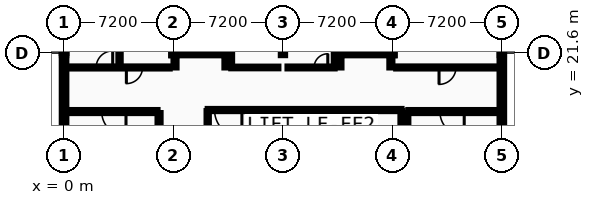
"""IFC4 building model, lengths in metres.
Left out: names, types, materials, properties, quantities, classifications, styles, units other than length and angle.
Written with IfcOpenShell. Run it as: python <this file> out.ifc"""

import sys

from ifc_helpers import new_model, si_unit, direction, frame, frame_2d, origin, origin_2d, place, context, subcontext, project, spatial, rectangle, i_section, extrude, element, fill, save


model = new_model("IFC4")
c1 = context("Model", 3, precision=1e-05, world=origin(), true_north=direction((0.0, 1.0)))
c2 = subcontext(c1, "Body", "Model", "MODEL_VIEW")
j1 = project(units=[si_unit("LENGTHUNIT", "METRE"), si_unit("PLANEANGLEUNIT", "RADIAN")], contexts=[c1])
p1 = place(None, origin())
s1 = spatial("IfcSite", under=j1, at=p1, CompositionType="ELEMENT")
p2 = place(p1, origin())
s2 = spatial("IfcBuilding", under=s1, at=p2, CompositionType="ELEMENT")
p3 = place(p2, frame((0.0, 0.0, 27.2)))
s3 = spatial("IfcBuildingStorey", under=s2, at=p3, CompositionType="ELEMENT", Elevation=27.2)
for number, where, z_axis, x_axis in (
    (1, (0.0, 21.6, 0.0), (0.0, 0.0, 1.0), (1.0, 0.0, 0.0)),
    (2, (7.2, 21.6, 0.0), (0.0, 0.0, 1.0), (1.0, 0.0, 0.0)),
    (3, (14.4, 21.6, 0.0), (0.0, 0.0, 1.0), (1.0, 0.0, 0.0)),
    (4, (21.6, 21.6, 0.0), (0.0, 0.0, 1.0), (1.0, 0.0, 0.0)),
    (5, (28.8, 21.6, 0.0), (0.0, 0.0, 1.0), (1.0, 0.0, 0.0)),
):
    element("IfcColumn", number, at=place(p3, frame(where, z_axis=z_axis, x_axis=x_axis)), inside=s3, PredefinedType="COLUMN", context=c2, shape_type="SweptSolid", body=[
        extrude(i_section(OverallWidth=0.28, OverallDepth=0.28, WebThickness=0.01, FlangeThickness=0.018, FilletRadius=0.024, at=origin_2d()), origin(), (0.0, 0.0, 1.0), 4.4),
    ])
p4 = place(p3, frame((0.0, 21.6, 0.0), z_axis=(0.0, 0.0, 1.0), x_axis=(0.0, -1.0, 0.0)))
e6 = element("IfcWall", 6, at=p4, inside=s3, PredefinedType="STANDARD", context=c2, shape_type="SweptSolid", body=[
    extrude(rectangle(XDim=7.15, YDim=0.3, at=frame_2d((3.575, 0.0))), origin(), (0.0, 0.0, 1.0), 4.18),
])
p5 = place(p4, frame((1.596, 0.0, 0.95)))
e7 = element("IfcOpeningElement", 7, at=p5, cuts=e6, PredefinedType="OPENING", context=c2, shape_type="SweptSolid", body=[
    extrude(rectangle(XDim=1.098, YDim=1.26, at=frame_2d((0.549, 0.63))), frame((0.0, 0.16, 0.0), z_axis=(0.0, -1.0, 0.0), x_axis=(1.0, 0.0, 0.0)), (0.0, 0.0, 1.0), 0.32),
])
p6 = place(p4, frame((4.456, 0.0, 0.95)))
e8 = element("IfcOpeningElement", 8, at=p6, cuts=e6, PredefinedType="OPENING", context=c2, shape_type="SweptSolid", body=[
    extrude(rectangle(XDim=1.098, YDim=1.26, at=frame_2d((0.549, 0.63))), frame((0.0, 0.16, 0.0), z_axis=(0.0, -1.0, 0.0), x_axis=(1.0, 0.0, 0.0)), (0.0, 0.0, 1.0), 0.32),
])
p7 = place(p3, frame((0.0, 28.8, 0.0), z_axis=(0.0, 0.0, 1.0), x_axis=(0.0, -1.0, 0.0)))
e9 = element("IfcWall", 9, at=p7, inside=s3, PredefinedType="STANDARD", context=c2, shape_type="SweptSolid", body=[
    extrude(rectangle(XDim=7.2, YDim=0.3, at=frame_2d((3.6, 0.0))), origin(), (0.0, 0.0, 1.0), 4.11),
])
p8 = place(p7, frame((1.594, 0.0, 0.95)))
e10 = element("IfcOpeningElement", 10, at=p8, cuts=e9, PredefinedType="OPENING", context=c2, shape_type="SweptSolid", body=[
    extrude(rectangle(XDim=1.132, YDim=1.26, at=frame_2d((0.566, 0.63))), frame((0.0, 0.16, 0.0), z_axis=(0.0, -1.0, 0.0), x_axis=(1.0, 0.0, 0.0)), (0.0, 0.0, 1.0), 0.32),
])
p9 = place(p7, frame((4.474, 0.0, 0.95)))
e11 = element("IfcOpeningElement", 11, at=p9, cuts=e9, PredefinedType="OPENING", context=c2, shape_type="SweptSolid", body=[
    extrude(rectangle(XDim=1.132, YDim=1.26, at=frame_2d((0.566, 0.63))), frame((0.0, 0.16, 0.0), z_axis=(0.0, -1.0, 0.0), x_axis=(1.0, 0.0, 0.0)), (0.0, 0.0, 1.0), 0.32),
])
p10 = place(p3, frame((28.8, 14.45, 0.0), z_axis=(0.0, 0.0, 1.0), x_axis=(0.0, 1.0, 0.0)))
e12 = element("IfcWall", 12, at=p10, inside=s3, PredefinedType="STANDARD", context=c2, shape_type="SweptSolid", body=[
    extrude(rectangle(XDim=7.15, YDim=0.3, at=frame_2d((3.575, 0.0))), origin(), (0.0, 0.0, 1.0), 4.18),
])
p11 = place(p10, frame((1.528, 0.0, 0.95)))
e13 = element("IfcOpeningElement", 13, at=p11, cuts=e12, PredefinedType="OPENING", context=c2, shape_type="SweptSolid", body=[
    extrude(rectangle(XDim=1.234, YDim=1.26, at=frame_2d((0.617, 0.63))), frame((0.0, 0.16, 0.0), z_axis=(0.0, -1.0, 0.0), x_axis=(1.0, 0.0, 0.0)), (0.0, 0.0, 1.0), 0.32),
])
p12 = place(p10, frame((4.388, 0.0, 0.95)))
e14 = element("IfcOpeningElement", 14, at=p12, cuts=e12, PredefinedType="OPENING", context=c2, shape_type="SweptSolid", body=[
    extrude(rectangle(XDim=1.234, YDim=1.26, at=frame_2d((0.617, 0.63))), frame((0.0, 0.16, 0.0), z_axis=(0.0, -1.0, 0.0), x_axis=(1.0, 0.0, 0.0)), (0.0, 0.0, 1.0), 0.32),
])
p13 = place(p3, frame((0.4, 17.75, 0.0), z_axis=(0.0, 0.0, 1.0), x_axis=(1.0, 0.0, 0.0)))
e15 = element("IfcWall", 15, at=p13, inside=s3, PredefinedType="PARTITIONING", context=c2, shape_type="SweptSolid", body=[
    extrude(rectangle(XDim=5.75, YDim=0.2, at=frame_2d((2.875, 0.0))), origin(), (0.0, 0.0, 1.0), 4.18),
])
p14 = place(p13, frame((2.075, 0.0, 0.0)))
e16 = element("IfcOpeningElement", 16, at=p14, cuts=e15, PredefinedType="OPENING", context=c2, shape_type="SweptSolid", body=[
    extrude(rectangle(XDim=1.6, YDim=2.2, at=frame_2d((0.8, 1.1))), frame((0.0, 0.11, 0.0), z_axis=(0.0, -1.0, 0.0), x_axis=(1.0, 0.0, 0.0)), (0.0, 0.0, 1.0), 0.22),
])
p15 = place(p3, frame((6.25, 14.45, 0.0), z_axis=(0.0, 0.0, 1.0), x_axis=(0.0, 1.0, 0.0)))
e17 = element("IfcWall", 17, at=p15, inside=s3, PredefinedType="PARTITIONING", context=c2, shape_type="SweptSolid", body=[
    extrude(rectangle(XDim=3.2, YDim=0.2, at=frame_2d((1.6, 0.0))), origin(), (0.0, 0.0, 1.0), 4.18),
])
p16 = place(p3, frame((22.65, 17.75, 0.0), z_axis=(0.0, 0.0, 1.0), x_axis=(1.0, 0.0, 0.0)))
e18 = element("IfcWall", 18, at=p16, inside=s3, PredefinedType="PARTITIONING", context=c2, shape_type="SweptSolid", body=[
    extrude(rectangle(XDim=5.75, YDim=0.2, at=frame_2d((2.875, 0.0))), origin(), (0.0, 0.0, 1.0), 4.18),
])
p17 = place(p16, frame((2.075, 0.0, 0.0)))
e19 = element("IfcOpeningElement", 19, at=p17, cuts=e18, PredefinedType="OPENING", context=c2, shape_type="SweptSolid", body=[
    extrude(rectangle(XDim=1.6, YDim=2.2, at=frame_2d((0.8, 1.1))), frame((0.0, 0.11, 0.0), z_axis=(0.0, -1.0, 0.0), x_axis=(1.0, 0.0, 0.0)), (0.0, 0.0, 1.0), 0.22),
])
p18 = place(p3, frame((22.55, 14.45, 0.0), z_axis=(0.0, 0.0, 1.0), x_axis=(0.0, 1.0, 0.0)))
e20 = element("IfcWall", 20, at=p18, inside=s3, PredefinedType="PARTITIONING", context=c2, shape_type="SweptSolid", body=[
    extrude(rectangle(XDim=3.2, YDim=0.2, at=frame_2d((1.6, 0.0))), origin(), (0.0, 0.0, 1.0), 4.18),
])
p19 = place(p3, frame((7.4, 21.625, 0.0), z_axis=(0.0, 0.0, 1.0), x_axis=(1.0, 0.0, 0.0)))
e21 = element("IfcWall", 21, at=p19, inside=s3, PredefinedType="SHEAR", context=c2, shape_type="SweptSolid", body=[
    extrude(rectangle(XDim=3.15, YDim=0.35, at=frame_2d((1.575, 0.0))), origin(), (0.0, 0.0, 1.0), 4.2),
])
p20 = place(p19, frame((1.025, 0.0, 0.0)))
e22 = element("IfcOpeningElement", 22, at=p20, cuts=e21, PredefinedType="OPENING", context=c2, shape_type="SweptSolid", body=[
    extrude(rectangle(XDim=1.1, YDim=2.15, at=frame_2d((0.55, 1.075))), frame((0.0, 0.185, 0.0), z_axis=(0.0, -1.0, 0.0), x_axis=(1.0, 0.0, 0.0)), (0.0, 0.0, 1.0), 0.37),
])
for number, where, z_axis, x_axis in (
    (23, (7.225, 21.45, 0.0), (0.0, 0.0, 1.0), (0.0, 1.0, 0.0)),
    (24, (10.725, 21.45, 0.0), (0.0, 0.0, 1.0), (0.0, 1.0, 0.0)),
):
    element("IfcWall", number, at=place(p3, frame(where, z_axis=z_axis, x_axis=x_axis)), inside=s3, PredefinedType="SHEAR", context=c2, shape_type="SweptSolid", body=[
        extrude(rectangle(XDim=7.5, YDim=0.35, at=frame_2d((3.75, 0.0))), origin(), (0.0, 0.0, 1.0), 4.2),
    ])
for number, where, z_axis, x_axis in (
    (25, (7.3, 20.65, 0.0), (0.0, 0.0, 1.0), (0.0, 1.0, 0.0)),
    (26, (10.65, 20.65, 0.0), (0.0, 0.0, 1.0), (0.0, 1.0, 0.0)),
):
    element("IfcWall", number, at=place(p3, frame(where, z_axis=z_axis, x_axis=x_axis)), inside=s3, PredefinedType="PARTITIONING", context=c2, shape_type="SweptSolid", body=[
        extrude(rectangle(XDim=0.8, YDim=0.2, at=frame_2d((0.4, 0.0))), origin(), (0.0, 0.0, 1.0), 3.85),
    ])
p21 = place(p3, frame((18.25, 21.625, 0.0), z_axis=(0.0, 0.0, 1.0), x_axis=(1.0, 0.0, 0.0)))
e27 = element("IfcWall", 27, at=p21, inside=s3, PredefinedType="SHEAR", context=c2, shape_type="SweptSolid", body=[
    extrude(rectangle(XDim=3.15, YDim=0.35, at=frame_2d((1.575, 0.0))), origin(), (0.0, 0.0, 1.0), 4.2),
])
p22 = place(p21, frame((1.025, 0.0, 0.0)))
e28 = element("IfcOpeningElement", 28, at=p22, cuts=e27, PredefinedType="OPENING", context=c2, shape_type="SweptSolid", body=[
    extrude(rectangle(XDim=1.1, YDim=2.15, at=frame_2d((0.55, 1.075))), frame((0.0, 0.185, 0.0), z_axis=(0.0, -1.0, 0.0), x_axis=(1.0, 0.0, 0.0)), (0.0, 0.0, 1.0), 0.37),
])
for number, where, z_axis, x_axis in (
    (29, (18.075, 21.45, 0.0), (0.0, 0.0, 1.0), (0.0, 1.0, 0.0)),
    (30, (21.575, 21.45, 0.0), (0.0, 0.0, 1.0), (0.0, 1.0, 0.0)),
):
    element("IfcWall", number, at=place(p3, frame(where, z_axis=z_axis, x_axis=x_axis)), inside=s3, PredefinedType="SHEAR", context=c2, shape_type="SweptSolid", body=[
        extrude(rectangle(XDim=7.5, YDim=0.35, at=frame_2d((3.75, 0.0))), origin(), (0.0, 0.0, 1.0), 4.2),
    ])
for number, where, z_axis, x_axis in (
    (31, (18.15, 20.65, 0.0), (0.0, 0.0, 1.0), (0.0, 1.0, 0.0)),
    (32, (21.5, 20.65, 0.0), (0.0, 0.0, 1.0), (0.0, 1.0, 0.0)),
):
    element("IfcWall", number, at=place(p3, frame(where, z_axis=z_axis, x_axis=x_axis)), inside=s3, PredefinedType="PARTITIONING", context=c2, shape_type="SweptSolid", body=[
        extrude(rectangle(XDim=0.8, YDim=0.2, at=frame_2d((0.4, 0.0))), origin(), (0.0, 0.0, 1.0), 3.85),
    ])
p23 = place(p3, frame((9.45, 17.85, 0.0), z_axis=(0.0, 0.0, 1.0), x_axis=(1.0, 0.0, 0.0)))
e33 = element("IfcWall", 33, at=p23, inside=s3, PredefinedType="PARTITIONING", context=c2, shape_type="SweptSolid", body=[
    extrude(rectangle(XDim=12.75, YDim=0.142, at=frame_2d((6.375, 0.0))), origin(), (0.0, 0.0, 1.0), 4.18),
])
p24 = place(p23, frame((0.45, 0.0, 0.0)))
e34 = element("IfcOpeningElement", 34, at=p24, cuts=e33, PredefinedType="OPENING", context=c2, shape_type="SweptSolid", body=[
    extrude(rectangle(XDim=1.8, YDim=2.3, at=frame_2d((0.9, 1.15))), frame((0.0, 0.081, 0.0), z_axis=(0.0, -1.0, 0.0), x_axis=(1.0, 0.0, 0.0)), (0.0, 0.0, 1.0), 0.162),
])
p25 = place(p23, frame((8.18, 0.0, 0.0)))
e35 = element("IfcOpeningElement", 35, at=p25, cuts=e33, PredefinedType="OPENING", context=c2, shape_type="SweptSolid", body=[
    extrude(rectangle(XDim=1.14, YDim=2.096, at=frame_2d((0.57, 1.048))), frame((0.0, 0.081, 0.0), z_axis=(0.0, -1.0, 0.0), x_axis=(1.0, 0.0, 0.0)), (0.0, 0.0, 1.0), 0.162),
])
p26 = place(p3, frame((0.2, 20.65, 0.0), z_axis=(0.0, 0.0, 1.0), x_axis=(1.0, 0.0, 0.0)))
e36 = element("IfcWall", 36, at=p26, inside=s3, PredefinedType="PARTITIONING", context=c2, shape_type="SweptSolid", body=[
    extrude(rectangle(XDim=6.75, YDim=0.135, at=frame_2d((3.375, 0.0))), origin(), (0.0, 0.0, 1.0), 4.18),
])
p27 = place(p26, frame((3.9, 0.0, 0.0)))
e37 = element("IfcOpeningElement", 37, at=p27, cuts=e36, PredefinedType="OPENING", context=c2, shape_type="SweptSolid", body=[
    extrude(rectangle(XDim=1.062, YDim=2.096, at=frame_2d((0.531, 1.048))), frame((0.0, 0.078, 0.0), z_axis=(0.0, -1.0, 0.0), x_axis=(1.0, 0.0, 0.0)), (0.0, 0.0, 1.0), 0.155),
])
p28 = place(p26, frame((1.912, 0.0, 0.0)))
e38 = element("IfcOpeningElement", 38, at=p28, cuts=e36, PredefinedType="OPENING", context=c2, shape_type="SweptSolid", body=[
    extrude(rectangle(XDim=1.088, YDim=2.096, at=frame_2d((0.544, 1.048))), frame((0.0, 0.078, 0.0), z_axis=(0.0, -1.0, 0.0), x_axis=(1.0, 0.0, 0.0)), (0.0, 0.0, 1.0), 0.155),
])
p29 = place(p3, frame((11.0, 20.65, 0.0), z_axis=(0.0, 0.0, 1.0), x_axis=(1.0, 0.0, 0.0)))
e39 = element("IfcWall", 39, at=p29, inside=s3, PredefinedType="PARTITIONING", context=c2, shape_type="SweptSolid", body=[
    extrude(rectangle(XDim=3.1, YDim=0.11, at=frame_2d((1.55, 0.0))), origin(), (0.0, 0.0, 1.0), 4.18),
])
p30 = place(p29, frame((0.45, 0.0, 0.0)))
e40 = element("IfcOpeningElement", 40, at=p30, cuts=e39, PredefinedType="OPENING", context=c2, shape_type="SweptSolid", body=[
    extrude(rectangle(XDim=1.0, YDim=2.1, at=frame_2d((0.5, 1.05))), frame((0.0, 0.065, 0.0), z_axis=(0.0, -1.0, 0.0), x_axis=(1.0, 0.0, 0.0)), (0.0, 0.0, 1.0), 0.13),
])
p31 = place(p3, frame((14.7, 20.65, 0.0), z_axis=(0.0, 0.0, 1.0), x_axis=(1.0, 0.0, 0.0)))
e41 = element("IfcWall", 41, at=p31, inside=s3, PredefinedType="PARTITIONING", context=c2, shape_type="SweptSolid", body=[
    extrude(rectangle(XDim=3.1, YDim=0.125, at=frame_2d((1.55, 0.0))), origin(), (0.0, 0.0, 1.0), 4.18),
])
p32 = place(p31, frame((1.75, 0.0, 0.0)))
e42 = element("IfcOpeningElement", 42, at=p32, cuts=e41, PredefinedType="OPENING", context=c2, shape_type="SweptSolid", body=[
    extrude(rectangle(XDim=0.9, YDim=2.1, at=frame_2d((0.45, 1.05))), frame((0.0, 0.073, 0.0), z_axis=(0.0, -1.0, 0.0), x_axis=(1.0, 0.0, 0.0)), (0.0, 0.0, 1.0), 0.145),
])
p33 = place(p3, frame((21.85, 20.65, 0.0), z_axis=(0.0, 0.0, 1.0), x_axis=(1.0, 0.0, 0.0)))
e43 = element("IfcWall", 43, at=p33, inside=s3, PredefinedType="PARTITIONING", context=c2, shape_type="SweptSolid", body=[
    extrude(rectangle(XDim=6.75, YDim=0.135, at=frame_2d((3.375, 0.0))), origin(), (0.0, 0.0, 1.0), 4.18),
])
p34 = place(p33, frame((2.818, 0.0, 0.0)))
e44 = element("IfcOpeningElement", 44, at=p34, cuts=e43, PredefinedType="OPENING", context=c2, shape_type="SweptSolid", body=[
    extrude(rectangle(XDim=1.114, YDim=2.096, at=frame_2d((0.557, 1.048))), frame((0.0, 0.078, 0.0), z_axis=(0.0, -1.0, 0.0), x_axis=(1.0, 0.0, 0.0)), (0.0, 0.0, 1.0), 0.155),
])
p35 = place(p3, frame((3.65, 20.718, 0.0), z_axis=(0.0, 0.0, 1.0), x_axis=(0.0, 1.0, 0.0)))
e45 = element("IfcWall", 45, at=p35, inside=s3, PredefinedType="PARTITIONING", context=c2, shape_type="SweptSolid", body=[
    extrude(rectangle(XDim=15.083, YDim=0.15, at=frame_2d((7.541, 0.0))), origin(), (0.0, 0.0, 1.0), 4.18),
])
p36 = place(p3, frame((9.45, 3.36, 0.0), z_axis=(0.0, 0.0, 1.0), x_axis=(0.0, 1.0, 0.0)))
e46 = element("IfcWall", 46, at=p36, inside=s3, PredefinedType="PARTITIONING", context=c2, shape_type="SweptSolid", body=[
    extrude(rectangle(XDim=14.419, YDim=0.15, at=frame_2d((7.209, 0.0))), origin(), (0.0, 0.0, 1.0), 4.18),
])
p37 = place(p3, frame((11.0, 20.705, 0.0), z_axis=(0.0, 0.0, 1.0), x_axis=(0.0, 1.0, 0.0)))
e47 = element("IfcWall", 47, at=p37, inside=s3, PredefinedType="PARTITIONING", context=c2, shape_type="SweptSolid", body=[
    extrude(rectangle(XDim=15.032, YDim=0.11, at=frame_2d((7.516, 0.0))), origin(), (0.0, 0.0, 1.0), 4.18),
])
p38 = place(p3, frame((14.2, 14.78, 0.0), z_axis=(0.0, 0.0, 1.0), x_axis=(0.0, 1.0, 0.0)))
e48 = element("IfcWall", 48, at=p38, inside=s3, PredefinedType="PARTITIONING", context=c2, shape_type="SweptSolid", body=[
    extrude(rectangle(XDim=2.999, YDim=0.135, at=frame_2d((1.5, 0.0))), origin(), (0.0, 0.0, 1.0), 4.18),
])
p39 = place(p3, frame((17.8, 20.712, 0.0), z_axis=(0.0, 0.0, 1.0), x_axis=(0.0, 1.0, 0.0)))
e49 = element("IfcWall", 49, at=p39, inside=s3, PredefinedType="PARTITIONING", context=c2, shape_type="SweptSolid", body=[
    extrude(rectangle(XDim=15.033, YDim=0.11, at=frame_2d((7.516, 0.0))), origin(), (0.0, 0.0, 1.0), 4.18),
])
p40 = place(p3, frame((22.2, 14.65, 0.0), z_axis=(0.0, 0.0, 1.0), x_axis=(0.0, 1.0, 0.0)))
e50 = element("IfcWall", 50, at=p40, inside=s3, PredefinedType="PARTITIONING", context=c2, shape_type="SweptSolid", body=[
    extrude(rectangle(XDim=3.129, YDim=0.142, at=frame_2d((1.564, 0.0))), origin(), (0.0, 0.0, 1.0), 4.18),
])
p41 = place(p5, origin())
e51 = element("IfcWindow", 51, at=p41, inside=s3, PartitioningType="SINGLE_PANEL", PredefinedType="WINDOW", context=c2, shape_type="SweptSolid", body=[
    extrude(rectangle(XDim=1.098, YDim=1.26, at=frame_2d((0.549, 0.63))), frame((0.0, 0.03, 0.0), z_axis=(0.0, -1.0, 0.0), x_axis=(1.0, 0.0, 0.0)), (0.0, 0.0, 1.0), 0.06),
])
fill(e7, e51)
p42 = place(p6, origin())
e52 = element("IfcWindow", 52, at=p42, inside=s3, PartitioningType="SINGLE_PANEL", PredefinedType="WINDOW", context=c2, shape_type="SweptSolid", body=[
    extrude(rectangle(XDim=1.098, YDim=1.26, at=frame_2d((0.549, 0.63))), frame((0.0, 0.03, 0.0), z_axis=(0.0, -1.0, 0.0), x_axis=(1.0, 0.0, 0.0)), (0.0, 0.0, 1.0), 0.06),
])
fill(e8, e52)
p43 = place(p11, origin())
e53 = element("IfcWindow", 53, at=p43, inside=s3, PartitioningType="SINGLE_PANEL", PredefinedType="WINDOW", context=c2, shape_type="SweptSolid", body=[
    extrude(rectangle(XDim=1.234, YDim=1.26, at=frame_2d((0.617, 0.63))), frame((0.0, 0.03, 0.0), z_axis=(0.0, -1.0, 0.0), x_axis=(1.0, 0.0, 0.0)), (0.0, 0.0, 1.0), 0.06),
])
fill(e13, e53)
p44 = place(p12, origin())
e54 = element("IfcWindow", 54, at=p44, inside=s3, PartitioningType="SINGLE_PANEL", PredefinedType="WINDOW", context=c2, shape_type="SweptSolid", body=[
    extrude(rectangle(XDim=1.234, YDim=1.26, at=frame_2d((0.617, 0.63))), frame((0.0, 0.03, 0.0), z_axis=(0.0, -1.0, 0.0), x_axis=(1.0, 0.0, 0.0)), (0.0, 0.0, 1.0), 0.06),
])
fill(e14, e54)
p45 = place(p14, origin())
e55 = element("IfcDoor", 55, at=p45, inside=s3, OperationType="DOUBLE_DOOR_SINGLE_SWING", PredefinedType="DOOR", context=c2, shape_type="SweptSolid", body=[
    extrude(rectangle(XDim=1.6, YDim=2.2, at=frame_2d((0.8, 1.1))), frame((0.0, 0.025, 0.0), z_axis=(0.0, -1.0, 0.0), x_axis=(1.0, 0.0, 0.0)), (0.0, 0.0, 1.0), 0.05),
])
fill(e16, e55)
p46 = place(p17, origin())
e56 = element("IfcDoor", 56, at=p46, inside=s3, OperationType="DOUBLE_DOOR_SINGLE_SWING", PredefinedType="DOOR", context=c2, shape_type="SweptSolid", body=[
    extrude(rectangle(XDim=1.6, YDim=2.2, at=frame_2d((0.8, 1.1))), frame((0.0, 0.025, 0.0), z_axis=(0.0, -1.0, 0.0), x_axis=(1.0, 0.0, 0.0)), (0.0, 0.0, 1.0), 0.05),
])
fill(e19, e56)
p47 = place(p20, frame((1.1, 0.0, 0.0), z_axis=(0.0, 0.0, 1.0), x_axis=(-1.0, 0.0, 0.0)))
e57 = element("IfcDoor", 57, at=p47, inside=s3, OperationType="SINGLE_SWING_RIGHT", PredefinedType="DOOR", context=c2, shape_type="SweptSolid", body=[
    extrude(rectangle(XDim=1.1, YDim=2.15, at=frame_2d((0.55, 1.075))), frame((0.0, 0.025, 0.0), z_axis=(0.0, -1.0, 0.0), x_axis=(1.0, 0.0, 0.0)), (0.0, 0.0, 1.0), 0.05),
])
fill(e22, e57)
p48 = place(p22, frame((1.1, 0.0, 0.0), z_axis=(0.0, 0.0, 1.0), x_axis=(-1.0, 0.0, 0.0)))
e58 = element("IfcDoor", 58, at=p48, inside=s3, OperationType="SINGLE_SWING_RIGHT", PredefinedType="DOOR", context=c2, shape_type="SweptSolid", body=[
    extrude(rectangle(XDim=1.1, YDim=2.15, at=frame_2d((0.55, 1.075))), frame((0.0, 0.025, 0.0), z_axis=(0.0, -1.0, 0.0), x_axis=(1.0, 0.0, 0.0)), (0.0, 0.0, 1.0), 0.05),
])
fill(e28, e58)
p49 = place(p30, frame((1.0, 0.0, 0.0), z_axis=(0.0, 0.0, 1.0), x_axis=(-1.0, 0.0, 0.0)))
e59 = element("IfcDoor", 59, at=p49, inside=s3, OperationType="SLIDING_TO_LEFT", PredefinedType="DOOR", context=c2, shape_type="SweptSolid", body=[
    extrude(rectangle(XDim=1.0, YDim=2.1, at=frame_2d((0.5, 1.05))), frame((0.0, 0.025, 0.0), z_axis=(0.0, -1.0, 0.0), x_axis=(1.0, 0.0, 0.0)), (0.0, 0.0, 1.0), 0.05),
])
fill(e40, e59)
p50 = place(p32, frame((0.9, 0.0, 0.0), z_axis=(0.0, 0.0, 1.0), x_axis=(-1.0, 0.0, 0.0)))
e60 = element("IfcDoor", 60, at=p50, inside=s3, OperationType="SINGLE_SWING_RIGHT", PredefinedType="DOOR", context=c2, shape_type="SweptSolid", body=[
    extrude(rectangle(XDim=0.9, YDim=2.1, at=frame_2d((0.45, 1.05))), frame((0.0, 0.025, 0.0), z_axis=(0.0, -1.0, 0.0), x_axis=(1.0, 0.0, 0.0)), (0.0, 0.0, 1.0), 0.05),
])
fill(e42, e60)
p51 = place(p27, frame((1.062, 0.0, 0.0), z_axis=(0.0, 0.0, 1.0), x_axis=(-1.0, 0.0, 0.0)))
e61 = element("IfcDoor", 61, at=p51, inside=s3, OperationType="SINGLE_SWING_LEFT", PredefinedType="DOOR", context=c2, shape_type="SweptSolid", body=[
    extrude(rectangle(XDim=1.062, YDim=2.096, at=frame_2d((0.531, 1.048))), frame((0.0, 0.025, 0.0), z_axis=(0.0, -1.0, 0.0), x_axis=(1.0, 0.0, 0.0)), (0.0, 0.0, 1.0), 0.05),
])
fill(e37, e61)
p52 = place(p28, frame((1.088, 0.0, 0.0), z_axis=(0.0, 0.0, 1.0), x_axis=(-1.0, 0.0, 0.0)))
e62 = element("IfcDoor", 62, at=p52, inside=s3, OperationType="SINGLE_SWING_RIGHT", PredefinedType="DOOR", context=c2, shape_type="SweptSolid", body=[
    extrude(rectangle(XDim=1.088, YDim=2.096, at=frame_2d((0.544, 1.048))), frame((0.0, 0.025, 0.0), z_axis=(0.0, -1.0, 0.0), x_axis=(1.0, 0.0, 0.0)), (0.0, 0.0, 1.0), 0.05),
])
fill(e38, e62)
p53 = place(p24, origin())
e63 = element("IfcDoor", 63, at=p53, inside=s3, OperationType="DOUBLE_DOOR_SINGLE_SWING", PredefinedType="DOOR", context=c2, shape_type="SweptSolid", body=[
    extrude(rectangle(XDim=1.8, YDim=2.3, at=frame_2d((0.9, 1.15))), frame((0.0, 0.025, 0.0), z_axis=(0.0, -1.0, 0.0), x_axis=(1.0, 0.0, 0.0)), (0.0, 0.0, 1.0), 0.05),
])
fill(e34, e63)
p54 = place(p34, frame((1.114, 0.0, 0.0), z_axis=(0.0, 0.0, 1.0), x_axis=(-1.0, 0.0, 0.0)))
e64 = element("IfcDoor", 64, at=p54, inside=s3, OperationType="SINGLE_SWING_LEFT", PredefinedType="DOOR", context=c2, shape_type="SweptSolid", body=[
    extrude(rectangle(XDim=1.114, YDim=2.096, at=frame_2d((0.557, 1.048))), frame((0.0, 0.025, 0.0), z_axis=(0.0, -1.0, 0.0), x_axis=(1.0, 0.0, 0.0)), (0.0, 0.0, 1.0), 0.05),
])
fill(e44, e64)
p55 = place(p25, origin())
e65 = element("IfcDoor", 65, at=p55, inside=s3, OperationType="SINGLE_SWING_RIGHT", PredefinedType="DOOR", context=c2, shape_type="SweptSolid", body=[
    extrude(rectangle(XDim=1.14, YDim=2.096, at=frame_2d((0.57, 1.048))), frame((0.0, 0.025, 0.0), z_axis=(0.0, -1.0, 0.0), x_axis=(1.0, 0.0, 0.0)), (0.0, 0.0, 1.0), 0.05),
])
fill(e35, e65)
save(model, sys.argv[1])
